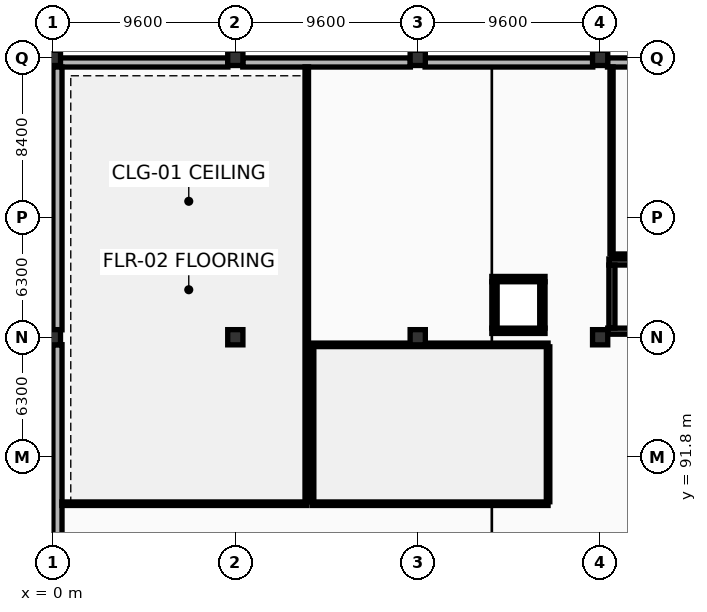
"""IFC4 building model, lengths in metres.
Left out: names, types, materials, properties, quantities, classifications, styles, units other than length and angle.
Written with IfcOpenShell. Run it as: python <this file> out.ifc"""

import sys

from ifc_helpers import new_model, si_unit, direction, frame, frame_2d, origin, origin_2d, place, context, subcontext, project, spatial, rectangle, extrude, element, fill, save


model = new_model("IFC4")
c1 = context("Model", 3, precision=1e-05, world=origin(), true_north=direction((0.0, 1.0)))
c2 = subcontext(c1, "Body", "Model", "MODEL_VIEW")
j1 = project(units=[si_unit("LENGTHUNIT", "METRE"), si_unit("PLANEANGLEUNIT", "RADIAN")], contexts=[c1])
p1 = place(None, origin())
s1 = spatial("IfcSite", under=j1, at=p1, CompositionType="ELEMENT")
p2 = place(p1, origin())
s2 = spatial("IfcBuilding", under=s1, at=p2, CompositionType="ELEMENT")
p3 = place(p2, origin())
s3 = spatial("IfcBuildingStorey", under=s2, at=p3, CompositionType="ELEMENT", Elevation=0.0)
for number, where, z_axis, x_axis in (
    (1, (0.0, 98.1, 0.0), (0.0, 0.0, 1.0), (1.0, 0.0, 0.0)),
    (2, (0.0, 112.8, 0.0), (0.0, 0.0, 1.0), (1.0, 0.0, 0.0)),
    (3, (9.6, 98.1, 0.0), (0.0, 0.0, 1.0), (1.0, 0.0, 0.0)),
    (4, (9.6, 112.8, 0.0), (0.0, 0.0, 1.0), (1.0, 0.0, 0.0)),
    (5, (19.2, 98.1, 0.0), (0.0, 0.0, 1.0), (1.0, 0.0, 0.0)),
    (6, (19.2, 112.8, 0.0), (0.0, 0.0, 1.0), (1.0, 0.0, 0.0)),
    (7, (28.8, 98.1, 0.0), (0.0, 0.0, 1.0), (1.0, 0.0, 0.0)),
    (8, (28.8, 112.8, 0.0), (0.0, 0.0, 1.0), (1.0, 0.0, 0.0)),
):
    element("IfcColumn", number, at=place(p3, frame(where, z_axis=z_axis, x_axis=x_axis)), inside=s3, PredefinedType="COLUMN", context=c2, shape_type="SweptSolid", body=[
        extrude(rectangle(XDim=0.8, YDim=0.8, at=origin_2d()), origin(), (0.0, 0.0, 1.0), 5.4),
    ])
p4 = place(p3, frame((0.392, 112.56, 0.0), z_axis=(0.0, 0.0, 1.0), x_axis=(1.0, 0.0, 0.0)))
e9 = element("IfcWall", 9, at=p4, inside=s3, PredefinedType="STANDARD", context=c2, shape_type="SweptSolid", body=[
    extrude(rectangle(XDim=8.816, YDim=0.48, at=frame_2d((4.408, 0.0))), origin(), (0.0, 0.0, 1.0), 4.18),
])
p5 = place(p4, frame((1.045, 0.0, 0.85)))
e10 = element("IfcOpeningElement", 10, at=p5, cuts=e9, PredefinedType="OPENING", context=c2, shape_type="SweptSolid", body=[
    extrude(rectangle(XDim=1.7, YDim=2.3, at=frame_2d((0.85, 1.15))), frame((0.0, 0.25, 0.0), z_axis=(0.0, -1.0, 0.0), x_axis=(1.0, 0.0, 0.0)), (0.0, 0.0, 1.0), 0.5),
])
p6 = place(p4, frame((3.558, 0.0, 0.85)))
e11 = element("IfcOpeningElement", 11, at=p6, cuts=e9, PredefinedType="OPENING", context=c2, shape_type="SweptSolid", body=[
    extrude(rectangle(XDim=1.7, YDim=2.3, at=frame_2d((0.85, 1.15))), frame((0.0, 0.25, 0.0), z_axis=(0.0, -1.0, 0.0), x_axis=(1.0, 0.0, 0.0)), (0.0, 0.0, 1.0), 0.5),
])
p7 = place(p4, frame((6.071, 0.0, 0.85)))
e12 = element("IfcOpeningElement", 12, at=p7, cuts=e9, PredefinedType="OPENING", context=c2, shape_type="SweptSolid", body=[
    extrude(rectangle(XDim=1.7, YDim=2.3, at=frame_2d((0.85, 1.15))), frame((0.0, 0.25, 0.0), z_axis=(0.0, -1.0, 0.0), x_axis=(1.0, 0.0, 0.0)), (0.0, 0.0, 1.0), 0.5),
])
p8 = place(p3, frame((9.992, 112.56, 0.0), z_axis=(0.0, 0.0, 1.0), x_axis=(1.0, 0.0, 0.0)))
e13 = element("IfcWall", 13, at=p8, inside=s3, PredefinedType="STANDARD", context=c2, shape_type="SweptSolid", body=[
    extrude(rectangle(XDim=8.821, YDim=0.48, at=frame_2d((4.411, 0.0))), origin(), (0.0, 0.0, 1.0), 4.18),
])
p9 = place(p8, frame((1.045, 0.0, 0.85)))
e14 = element("IfcOpeningElement", 14, at=p9, cuts=e13, PredefinedType="OPENING", context=c2, shape_type="SweptSolid", body=[
    extrude(rectangle(XDim=1.7, YDim=2.3, at=frame_2d((0.85, 1.15))), frame((0.0, 0.25, 0.0), z_axis=(0.0, -1.0, 0.0), x_axis=(1.0, 0.0, 0.0)), (0.0, 0.0, 1.0), 0.5),
])
p10 = place(p8, frame((6.071, 0.0, 0.85)))
e15 = element("IfcOpeningElement", 15, at=p10, cuts=e13, PredefinedType="OPENING", context=c2, shape_type="SweptSolid", body=[
    extrude(rectangle(XDim=1.7, YDim=2.3, at=frame_2d((0.85, 1.15))), frame((0.0, 0.25, 0.0), z_axis=(0.0, -1.0, 0.0), x_axis=(1.0, 0.0, 0.0)), (0.0, 0.0, 1.0), 0.5),
])
p11 = place(p3, frame((19.587, 112.56, 0.0), z_axis=(0.0, 0.0, 1.0), x_axis=(1.0, 0.0, 0.0)))
e16 = element("IfcWall", 16, at=p11, inside=s3, PredefinedType="STANDARD", context=c2, shape_type="SweptSolid", body=[
    extrude(rectangle(XDim=8.826, YDim=0.48, at=frame_2d((4.413, 0.0))), origin(), (0.0, 0.0, 1.0), 4.18),
])
p12 = place(p11, frame((6.583, 0.0, 0.0)))
e17 = element("IfcOpeningElement", 17, at=p12, cuts=e16, PredefinedType="OPENING", context=c2, shape_type="SweptSolid", body=[
    extrude(rectangle(XDim=1.8, YDim=2.25, at=frame_2d((0.9, 1.125))), frame((0.0, 0.25, 0.0), z_axis=(0.0, -1.0, 0.0), x_axis=(1.0, 0.0, 0.0)), (0.0, 0.0, 1.0), 0.5),
])
p13 = place(p3, frame((29.187, 112.56, 0.0), z_axis=(0.0, 0.0, 1.0), x_axis=(1.0, 0.0, 0.0)))
e18 = element("IfcWall", 18, at=p13, inside=s3, PredefinedType="STANDARD", context=c2, shape_type="SweptSolid", body=[
    extrude(rectangle(XDim=8.821, YDim=0.48, at=frame_2d((4.411, 0.0))), origin(), (0.0, 0.0, 1.0), 4.18),
])
p14 = place(p13, frame((1.05, 0.0, 0.85)))
e19 = element("IfcOpeningElement", 19, at=p14, cuts=e18, PredefinedType="OPENING", context=c2, shape_type="SweptSolid", body=[
    extrude(rectangle(XDim=1.7, YDim=2.3, at=frame_2d((0.85, 1.15))), frame((0.0, 0.25, 0.0), z_axis=(0.0, -1.0, 0.0), x_axis=(1.0, 0.0, 0.0)), (0.0, 0.0, 1.0), 0.5),
])
p15 = place(p13, frame((3.563, 0.0, 0.85)))
e20 = element("IfcOpeningElement", 20, at=p15, cuts=e18, PredefinedType="OPENING", context=c2, shape_type="SweptSolid", body=[
    extrude(rectangle(XDim=1.7, YDim=2.3, at=frame_2d((0.85, 1.15))), frame((0.0, 0.25, 0.0), z_axis=(0.0, -1.0, 0.0), x_axis=(1.0, 0.0, 0.0)), (0.0, 0.0, 1.0), 0.5),
])
p16 = place(p13, frame((6.076, 0.0, 0.85)))
e21 = element("IfcOpeningElement", 21, at=p16, cuts=e18, PredefinedType="OPENING", context=c2, shape_type="SweptSolid", body=[
    extrude(rectangle(XDim=1.7, YDim=2.3, at=frame_2d((0.85, 1.15))), frame((0.0, 0.25, 0.0), z_axis=(0.0, -1.0, 0.0), x_axis=(1.0, 0.0, 0.0)), (0.0, 0.0, 1.0), 0.5),
])
p17 = place(p3, frame((0.24, 85.892, 0.0), z_axis=(0.0, 0.0, 1.0), x_axis=(0.0, 1.0, 0.0)))
e22 = element("IfcWall", 22, at=p17, inside=s3, PredefinedType="STANDARD", context=c2, shape_type="SweptSolid", body=[
    extrude(rectangle(XDim=11.816, YDim=0.48, at=frame_2d((5.908, 0.0))), origin(), (0.0, 0.0, 1.0), 4.18),
])
p18 = place(p17, frame((0.988, 0.0, 0.0)))
e23 = element("IfcOpeningElement", 23, at=p18, cuts=e22, PredefinedType="OPENING", context=c2, shape_type="SweptSolid", body=[
    extrude(rectangle(XDim=1.8, YDim=2.25, at=frame_2d((0.9, 1.125))), frame((0.0, 0.25, 0.0), z_axis=(0.0, -1.0, 0.0), x_axis=(1.0, 0.0, 0.0)), (0.0, 0.0, 1.0), 0.5),
])
p19 = place(p3, frame((0.24, 98.492, 0.0), z_axis=(0.0, 0.0, 1.0), x_axis=(0.0, 1.0, 0.0)))
e24 = element("IfcWall", 24, at=p19, inside=s3, PredefinedType="STANDARD", context=c2, shape_type="SweptSolid", body=[
    extrude(rectangle(XDim=13.828, YDim=0.48, at=frame_2d((6.914, 0.0))), origin(), (0.0, 0.0, 1.0), 4.18),
])
p20 = place(p19, frame((1.895, 0.0, 0.85)))
e25 = element("IfcOpeningElement", 25, at=p20, cuts=e24, PredefinedType="OPENING", context=c2, shape_type="SweptSolid", body=[
    extrude(rectangle(XDim=1.7, YDim=2.3, at=frame_2d((0.85, 1.15))), frame((0.0, 0.25, 0.0), z_axis=(0.0, -1.0, 0.0), x_axis=(1.0, 0.0, 0.0)), (0.0, 0.0, 1.0), 0.5),
])
p21 = place(p19, frame((6.108, 0.0, 0.85)))
e26 = element("IfcOpeningElement", 26, at=p21, cuts=e24, PredefinedType="OPENING", context=c2, shape_type="SweptSolid", body=[
    extrude(rectangle(XDim=1.7, YDim=2.3, at=frame_2d((0.85, 1.15))), frame((0.0, 0.25, 0.0), z_axis=(0.0, -1.0, 0.0), x_axis=(1.0, 0.0, 0.0)), (0.0, 0.0, 1.0), 0.5),
])
p22 = place(p19, frame((10.321, 0.0, 0.85)))
e27 = element("IfcOpeningElement", 27, at=p22, cuts=e24, PredefinedType="OPENING", context=c2, shape_type="SweptSolid", body=[
    extrude(rectangle(XDim=1.7, YDim=2.3, at=frame_2d((0.85, 1.15))), frame((0.0, 0.25, 0.0), z_axis=(0.0, -1.0, 0.0), x_axis=(1.0, 0.0, 0.0)), (0.0, 0.0, 1.0), 0.5),
])
p23 = place(p3, frame((29.26, 102.06, 0.0), z_axis=(0.0, 0.0, 1.0), x_axis=(1.0, 0.0, 0.0)))
e28 = element("IfcWall", 28, at=p23, inside=s3, PredefinedType="SHEAR", context=c2, shape_type="SweptSolid", body=[
    extrude(rectangle(XDim=9.18, YDim=0.32, at=frame_2d((4.59, 0.0))), origin(), (0.0, 0.0, 1.0), 5.14),
])
p24 = place(p3, frame((38.44, 98.42, 0.0), z_axis=(0.0, 0.0, 1.0), x_axis=(-1.0, 0.0, 0.0)))
e29 = element("IfcWall", 29, at=p24, inside=s3, PredefinedType="SHEAR", context=c2, shape_type="SweptSolid", body=[
    extrude(rectangle(XDim=9.24, YDim=0.32, at=frame_2d((4.62, 0.0))), origin(), (0.0, 0.0, 1.0), 5.14),
])
p25 = place(p3, frame((29.42, 98.58, 0.0), z_axis=(0.0, 0.0, 1.0), x_axis=(0.0, 1.0, 0.0)))
e30 = element("IfcWall", 30, at=p25, inside=s3, PredefinedType="SHEAR", context=c2, shape_type="SweptSolid", body=[
    extrude(rectangle(XDim=3.32, YDim=0.32, at=frame_2d((1.66, 0.0))), origin(), (0.0, 0.0, 1.0), 5.14),
])
p26 = place(p25, frame((1.085, 0.0, 0.0)))
e31 = element("IfcOpeningElement", 31, at=p26, cuts=e30, PredefinedType="OPENING", context=c2, shape_type="SweptSolid", body=[
    extrude(rectangle(XDim=1.15, YDim=2.2, at=frame_2d((0.575, 1.1))), frame((0.0, 0.17, 0.0), z_axis=(0.0, -1.0, 0.0), x_axis=(1.0, 0.0, 0.0)), (0.0, 0.0, 1.0), 0.34),
])
p27 = place(p3, frame((23.1, 101.16, 0.0), z_axis=(0.0, 0.0, 1.0), x_axis=(1.0, 0.0, 0.0)))
e32 = element("IfcWall", 32, at=p27, inside=s3, PredefinedType="SHEAR", context=c2, shape_type="SweptSolid", body=[
    extrude(rectangle(XDim=2.8, YDim=0.28, at=frame_2d((1.4, 0.0))), origin(), (0.0, 0.0, 1.0), 5.14),
])
p28 = place(p3, frame((25.9, 98.44, 0.0), z_axis=(0.0, 0.0, 1.0), x_axis=(-1.0, 0.0, 0.0)))
e33 = element("IfcWall", 33, at=p28, inside=s3, PredefinedType="SHEAR", context=c2, shape_type="SweptSolid", body=[
    extrude(rectangle(XDim=2.8, YDim=0.28, at=frame_2d((1.4, 0.0))), origin(), (0.0, 0.0, 1.0), 5.14),
])
p29 = place(p28, frame((0.925, 0.0, 0.0)))
e34 = element("IfcOpeningElement", 34, at=p29, cuts=e33, PredefinedType="OPENING", context=c2, shape_type="SweptSolid", body=[
    extrude(rectangle(XDim=0.95, YDim=2.15, at=frame_2d((0.475, 1.075))), frame((0.0, 0.15, 0.0), z_axis=(0.0, -1.0, 0.0), x_axis=(1.0, 0.0, 0.0)), (0.0, 0.0, 1.0), 0.3),
])
for number, where, z_axis, x_axis in (
    (35, (23.24, 98.58, 0.0), (0.0, 0.0, 1.0), (0.0, 1.0, 0.0)),
    (36, (25.76, 101.02, 0.0), (0.0, 0.0, 1.0), (0.0, -1.0, 0.0)),
):
    element("IfcWall", number, at=place(p3, frame(where, z_axis=z_axis, x_axis=x_axis)), inside=s3, PredefinedType="SHEAR", context=c2, shape_type="SweptSolid", body=[
        extrude(rectangle(XDim=2.44, YDim=0.28, at=frame_2d((1.22, 0.0))), origin(), (0.0, 0.0, 1.0), 5.14),
    ])
p30 = place(p3, frame((13.36, 89.34, 0.0), z_axis=(0.0, 0.0, 1.0), x_axis=(-1.0, 0.0, 0.0)))
e37 = element("IfcWall", 37, at=p30, inside=s3, PredefinedType="PARTITIONING", context=c2, shape_type="SweptSolid", body=[
    extrude(rectangle(XDim=12.886, YDim=0.185, at=frame_2d((6.443, 0.0))), origin(), (0.0, 0.0, 1.0), 4.23),
])
p31 = place(p30, frame((1.878, 0.0, 0.0)))
e38 = element("IfcOpeningElement", 38, at=p31, cuts=e37, PredefinedType="OPENING", context=c2, shape_type="SweptSolid", body=[
    extrude(rectangle(XDim=2.0, YDim=2.5, at=frame_2d((1.0, 1.25))), frame((0.0, 0.103, 0.0), z_axis=(0.0, -1.0, 0.0), x_axis=(1.0, 0.0, 0.0)), (0.0, 0.0, 1.0), 0.205),
])
p32 = place(p3, frame((13.36, 112.326, 0.0), z_axis=(0.0, 0.0, 1.0), x_axis=(0.0, -1.0, 0.0)))
e39 = element("IfcWall", 39, at=p32, inside=s3, PredefinedType="PARTITIONING", context=c2, shape_type="SweptSolid", body=[
    extrude(rectangle(XDim=22.884, YDim=0.185, at=frame_2d((11.442, 0.0))), origin(), (0.0, 0.0, 1.0), 4.33),
])
p33 = place(p3, frame((13.64, 97.7, 0.0), z_axis=(0.0, 0.0, 1.0), x_axis=(1.0, 0.0, 0.0)))
e40 = element("IfcWall", 40, at=p33, inside=s3, PredefinedType="PARTITIONING", context=c2, shape_type="SweptSolid", body=[
    extrude(rectangle(XDim=12.42, YDim=0.185, at=frame_2d((6.21, 0.0))), origin(), (0.0, 0.0, 1.0), 4.18),
])
p34 = place(p3, frame((26.06, 89.34, 0.0), z_axis=(0.0, 0.0, 1.0), x_axis=(-1.0, 0.0, 0.0)))
e41 = element("IfcWall", 41, at=p34, inside=s3, PredefinedType="PARTITIONING", context=c2, shape_type="SweptSolid", body=[
    extrude(rectangle(XDim=12.42, YDim=0.185, at=frame_2d((6.21, 0.0))), origin(), (0.0, 0.0, 1.0), 4.23),
])
p35 = place(p34, frame((1.808, 0.0, 0.0)))
e42 = element("IfcOpeningElement", 42, at=p35, cuts=e41, PredefinedType="OPENING", context=c2, shape_type="SweptSolid", body=[
    extrude(rectangle(XDim=2.0, YDim=2.5, at=frame_2d((1.0, 1.25))), frame((0.0, 0.103, 0.0), z_axis=(0.0, -1.0, 0.0), x_axis=(1.0, 0.0, 0.0)), (0.0, 0.0, 1.0), 0.205),
])
for number, where, z_axis, x_axis in (
    (43, (13.64, 89.442, 0.0), (0.0, 0.0, 1.0), (0.0, 1.0, 0.0)),
    (44, (26.06, 97.597, 0.0), (0.0, 0.0, 1.0), (0.0, -1.0, 0.0)),
):
    element("IfcWall", number, at=place(p3, frame(where, z_axis=z_axis, x_axis=x_axis)), inside=s3, PredefinedType="PARTITIONING", context=c2, shape_type="SweptSolid", body=[
        extrude(rectangle(XDim=8.155, YDim=0.185, at=frame_2d((4.078, 0.0))), origin(), (0.0, 0.0, 1.0), 4.48),
    ])
p36 = place(p3, frame((45.6, 102.4, 0.0), z_axis=(0.0, 0.0, 1.0), x_axis=(-1.0, 0.0, 0.0)))
e45 = element("IfcWall", 45, at=p36, inside=s3, PredefinedType="PARTITIONING", context=c2, shape_type="SweptSolid", body=[
    extrude(rectangle(XDim=16.2, YDim=0.165, at=frame_2d((8.1, 0.0))), origin(), (0.0, 0.0, 1.0), 4.18),
])
p37 = place(p3, frame((29.4, 102.492, 0.0), z_axis=(0.0, 0.0, 1.0), x_axis=(0.0, 1.0, 0.0)))
e46 = element("IfcWall", 46, at=p37, inside=s3, PredefinedType="PARTITIONING", context=c2, shape_type="SweptSolid", body=[
    extrude(rectangle(XDim=9.833, YDim=0.165, at=frame_2d((4.917, 0.0))), origin(), (0.0, 0.0, 1.0), 4.48),
])
p38 = place(p37, frame((1.977, 0.0, 0.0)))
e47 = element("IfcOpeningElement", 47, at=p38, cuts=e46, PredefinedType="OPENING", context=c2, shape_type="SweptSolid", body=[
    extrude(rectangle(XDim=1.0, YDim=2.15, at=frame_2d((0.5, 1.075))), frame((0.0, 0.093, 0.0), z_axis=(0.0, -1.0, 0.0), x_axis=(1.0, 0.0, 0.0)), (0.0, 0.0, 1.0), 0.185),
])
p39 = place(p5, origin())
e48 = element("IfcWindow", 48, at=p39, inside=s3, PartitioningType="SINGLE_PANEL", PredefinedType="WINDOW", context=c2, shape_type="SweptSolid", body=[
    extrude(rectangle(XDim=1.7, YDim=2.3, at=frame_2d((0.85, 1.15))), frame((0.0, 0.03, 0.0), z_axis=(0.0, -1.0, 0.0), x_axis=(1.0, 0.0, 0.0)), (0.0, 0.0, 1.0), 0.06),
])
fill(e10, e48)
p40 = place(p6, origin())
e49 = element("IfcWindow", 49, at=p40, inside=s3, PartitioningType="SINGLE_PANEL", PredefinedType="WINDOW", context=c2, shape_type="SweptSolid", body=[
    extrude(rectangle(XDim=1.7, YDim=2.3, at=frame_2d((0.85, 1.15))), frame((0.0, 0.03, 0.0), z_axis=(0.0, -1.0, 0.0), x_axis=(1.0, 0.0, 0.0)), (0.0, 0.0, 1.0), 0.06),
])
fill(e11, e49)
p41 = place(p7, origin())
e50 = element("IfcWindow", 50, at=p41, inside=s3, PartitioningType="SINGLE_PANEL", PredefinedType="WINDOW", context=c2, shape_type="SweptSolid", body=[
    extrude(rectangle(XDim=1.7, YDim=2.3, at=frame_2d((0.85, 1.15))), frame((0.0, 0.03, 0.0), z_axis=(0.0, -1.0, 0.0), x_axis=(1.0, 0.0, 0.0)), (0.0, 0.0, 1.0), 0.06),
])
fill(e12, e50)
p42 = place(p9, origin())
e51 = element("IfcWindow", 51, at=p42, inside=s3, PartitioningType="SINGLE_PANEL", PredefinedType="WINDOW", context=c2, shape_type="SweptSolid", body=[
    extrude(rectangle(XDim=1.7, YDim=2.3, at=frame_2d((0.85, 1.15))), frame((0.0, 0.03, 0.0), z_axis=(0.0, -1.0, 0.0), x_axis=(1.0, 0.0, 0.0)), (0.0, 0.0, 1.0), 0.06),
])
fill(e14, e51)
p43 = place(p10, origin())
e52 = element("IfcWindow", 52, at=p43, inside=s3, PartitioningType="SINGLE_PANEL", PredefinedType="WINDOW", context=c2, shape_type="SweptSolid", body=[
    extrude(rectangle(XDim=1.7, YDim=2.3, at=frame_2d((0.85, 1.15))), frame((0.0, 0.03, 0.0), z_axis=(0.0, -1.0, 0.0), x_axis=(1.0, 0.0, 0.0)), (0.0, 0.0, 1.0), 0.06),
])
fill(e15, e52)
p44 = place(p12, origin())
e53 = element("IfcDoor", 53, at=p44, inside=s3, OperationType="DOUBLE_DOOR_SINGLE_SWING", PredefinedType="DOOR", context=c2, shape_type="SweptSolid", body=[
    extrude(rectangle(XDim=1.8, YDim=2.25, at=frame_2d((0.9, 1.125))), frame((0.0, 0.025, 0.0), z_axis=(0.0, -1.0, 0.0), x_axis=(1.0, 0.0, 0.0)), (0.0, 0.0, 1.0), 0.05),
])
fill(e17, e53)
p45 = place(p18, origin())
e54 = element("IfcDoor", 54, at=p45, inside=s3, OperationType="DOUBLE_DOOR_SINGLE_SWING", PredefinedType="DOOR", context=c2, shape_type="SweptSolid", body=[
    extrude(rectangle(XDim=1.8, YDim=2.25, at=frame_2d((0.9, 1.125))), frame((0.0, 0.025, 0.0), z_axis=(0.0, -1.0, 0.0), x_axis=(1.0, 0.0, 0.0)), (0.0, 0.0, 1.0), 0.05),
])
fill(e23, e54)
p46 = place(p20, origin())
e55 = element("IfcWindow", 55, at=p46, inside=s3, PartitioningType="SINGLE_PANEL", PredefinedType="WINDOW", context=c2, shape_type="SweptSolid", body=[
    extrude(rectangle(XDim=1.7, YDim=2.3, at=frame_2d((0.85, 1.15))), frame((0.0, 0.03, 0.0), z_axis=(0.0, -1.0, 0.0), x_axis=(1.0, 0.0, 0.0)), (0.0, 0.0, 1.0), 0.06),
])
fill(e25, e55)
p47 = place(p21, origin())
e56 = element("IfcWindow", 56, at=p47, inside=s3, PartitioningType="SINGLE_PANEL", PredefinedType="WINDOW", context=c2, shape_type="SweptSolid", body=[
    extrude(rectangle(XDim=1.7, YDim=2.3, at=frame_2d((0.85, 1.15))), frame((0.0, 0.03, 0.0), z_axis=(0.0, -1.0, 0.0), x_axis=(1.0, 0.0, 0.0)), (0.0, 0.0, 1.0), 0.06),
])
fill(e26, e56)
p48 = place(p22, origin())
e57 = element("IfcWindow", 57, at=p48, inside=s3, PartitioningType="SINGLE_PANEL", PredefinedType="WINDOW", context=c2, shape_type="SweptSolid", body=[
    extrude(rectangle(XDim=1.7, YDim=2.3, at=frame_2d((0.85, 1.15))), frame((0.0, 0.03, 0.0), z_axis=(0.0, -1.0, 0.0), x_axis=(1.0, 0.0, 0.0)), (0.0, 0.0, 1.0), 0.06),
])
fill(e27, e57)
p49 = place(p26, origin())
e58 = element("IfcDoor", 58, at=p49, inside=s3, OperationType="SINGLE_SWING_RIGHT", PredefinedType="DOOR", context=c2, shape_type="SweptSolid", body=[
    extrude(rectangle(XDim=1.15, YDim=2.2, at=frame_2d((0.575, 1.1))), frame((0.0, 0.025, 0.0), z_axis=(0.0, -1.0, 0.0), x_axis=(1.0, 0.0, 0.0)), (0.0, 0.0, 1.0), 0.05),
])
fill(e31, e58)
p50 = place(p29, origin())
e59 = element("IfcDoor", 59, at=p50, inside=s3, OperationType="DOUBLE_DOOR_SLIDING", PredefinedType="DOOR", context=c2, shape_type="SweptSolid", body=[
    extrude(rectangle(XDim=0.95, YDim=2.15, at=frame_2d((0.475, 1.075))), frame((0.0, 0.025, 0.0), z_axis=(0.0, -1.0, 0.0), x_axis=(1.0, 0.0, 0.0)), (0.0, 0.0, 1.0), 0.05),
])
fill(e34, e59)
p51 = place(p31, origin())
e60 = element("IfcDoor", 60, at=p51, inside=s3, OperationType="DOUBLE_DOOR_SINGLE_SWING", PredefinedType="DOOR", context=c2, shape_type="SweptSolid", body=[
    extrude(rectangle(XDim=2.0, YDim=2.5, at=frame_2d((1.0, 1.25))), frame((0.0, 0.025, 0.0), z_axis=(0.0, -1.0, 0.0), x_axis=(1.0, 0.0, 0.0)), (0.0, 0.0, 1.0), 0.05),
])
fill(e38, e60)
p52 = place(p35, origin())
e61 = element("IfcDoor", 61, at=p52, inside=s3, OperationType="DOUBLE_DOOR_SINGLE_SWING", PredefinedType="DOOR", context=c2, shape_type="SweptSolid", body=[
    extrude(rectangle(XDim=2.0, YDim=2.5, at=frame_2d((1.0, 1.25))), frame((0.0, 0.025, 0.0), z_axis=(0.0, -1.0, 0.0), x_axis=(1.0, 0.0, 0.0)), (0.0, 0.0, 1.0), 0.05),
])
fill(e42, e61)
p53 = place(p38, origin())
e62 = element("IfcDoor", 62, at=p53, inside=s3, OperationType="SINGLE_SWING_RIGHT", PredefinedType="DOOR", context=c2, shape_type="SweptSolid", body=[
    extrude(rectangle(XDim=1.0, YDim=2.15, at=frame_2d((0.5, 1.075))), frame((0.0, 0.025, 0.0), z_axis=(0.0, -1.0, 0.0), x_axis=(1.0, 0.0, 0.0)), (0.0, 0.0, 1.0), 0.05),
])
fill(e47, e62)
save(model, sys.argv[1])
